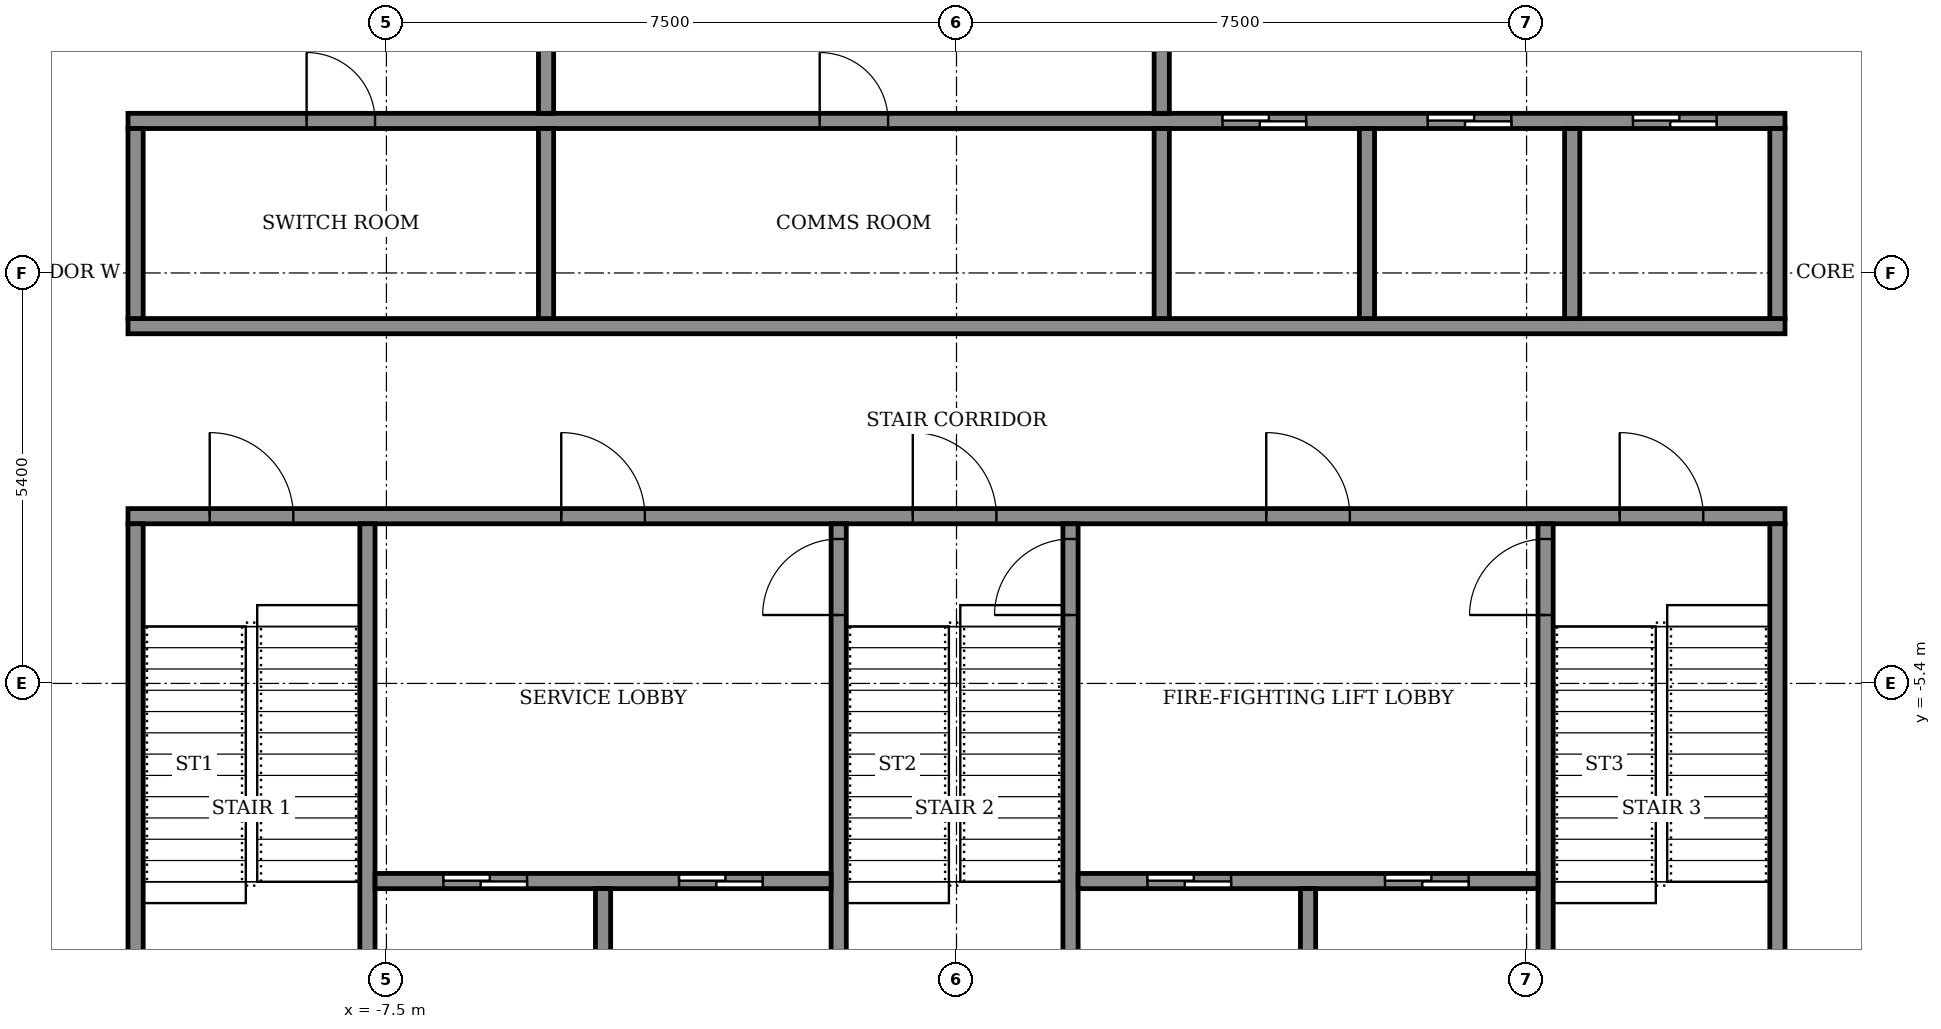
"""IFC4 building model, lengths in metres.
Left out: names, types, materials, properties, quantities, classifications, styles, units other than length and angle.
Written with IfcOpenShell. Run it as: python <this file> out.ifc"""

import sys

from ifc_helpers import new_model, si_unit, direction, frame, frame_2d, origin, place, context, subcontext, project, spatial, rectangle, extrude, element, fill, save


model = new_model("IFC4")
c1 = context("Model", 3, precision=1e-05, world=origin(), true_north=direction((0.0, 1.0)))
c2 = subcontext(c1, "Body", "Model", "MODEL_VIEW")
j1 = project(units=[si_unit("LENGTHUNIT", "METRE"), si_unit("PLANEANGLEUNIT", "RADIAN")], contexts=[c1])
p1 = place(None, origin())
s1 = spatial("IfcSite", under=j1, at=p1, CompositionType="ELEMENT")
p2 = place(p1, origin())
s2 = spatial("IfcBuilding", under=s1, at=p2, CompositionType="ELEMENT")
p3 = place(p2, frame((0.0, 0.0, 148.1)))
s3 = spatial("IfcBuildingStorey", under=s2, at=p3, CompositionType="ELEMENT", Elevation=148.1)
p4 = place(p3, frame((-10.9, -3.2, 0.0), z_axis=(0.0, 0.0, 1.0), x_axis=(1.0, 0.0, 0.0)))
e1 = element("IfcWall", 1, at=p4, inside=s3, PredefinedType="SHEAR", context=c2, shape_type="SweptSolid", body=[
    extrude(rectangle(XDim=21.8, YDim=0.2, at=frame_2d((10.9, 0.0))), origin(), (0.0, 0.0, 1.0), 4.05),
])
p5 = place(p4, frame((1.075, 0.0, 0.0)))
e2 = element("IfcOpeningElement", 2, at=p5, cuts=e1, PredefinedType="OPENING", context=c2, shape_type="SweptSolid", body=[
    extrude(rectangle(XDim=1.1, YDim=2.1, at=frame_2d((0.55, 1.05))), frame((0.0, 0.11, 0.0), z_axis=(0.0, -1.0, 0.0), x_axis=(1.0, 0.0, 0.0)), (0.0, 0.0, 1.0), 0.22),
])
p6 = place(p4, frame((10.325, 0.0, 0.0)))
e3 = element("IfcOpeningElement", 3, at=p6, cuts=e1, PredefinedType="OPENING", context=c2, shape_type="SweptSolid", body=[
    extrude(rectangle(XDim=1.1, YDim=2.1, at=frame_2d((0.55, 1.05))), frame((0.0, 0.11, 0.0), z_axis=(0.0, -1.0, 0.0), x_axis=(1.0, 0.0, 0.0)), (0.0, 0.0, 1.0), 0.22),
])
p7 = place(p4, frame((19.625, 0.0, 0.0)))
e4 = element("IfcOpeningElement", 4, at=p7, cuts=e1, PredefinedType="OPENING", context=c2, shape_type="SweptSolid", body=[
    extrude(rectangle(XDim=1.1, YDim=2.1, at=frame_2d((0.55, 1.05))), frame((0.0, 0.11, 0.0), z_axis=(0.0, -1.0, 0.0), x_axis=(1.0, 0.0, 0.0)), (0.0, 0.0, 1.0), 0.22),
])
p8 = place(p4, frame((5.7, 0.0, 0.0)))
e5 = element("IfcOpeningElement", 5, at=p8, cuts=e1, PredefinedType="OPENING", context=c2, shape_type="SweptSolid", body=[
    extrude(rectangle(XDim=1.1, YDim=2.1, at=frame_2d((0.55, 1.05))), frame((0.0, 0.11, 0.0), z_axis=(0.0, -1.0, 0.0), x_axis=(1.0, 0.0, 0.0)), (0.0, 0.0, 1.0), 0.22),
])
p9 = place(p4, frame((14.975, 0.0, 0.0)))
e6 = element("IfcOpeningElement", 6, at=p9, cuts=e1, PredefinedType="OPENING", context=c2, shape_type="SweptSolid", body=[
    extrude(rectangle(XDim=1.1, YDim=2.1, at=frame_2d((0.55, 1.05))), frame((0.0, 0.11, 0.0), z_axis=(0.0, -1.0, 0.0), x_axis=(1.0, 0.0, 0.0)), (0.0, 0.0, 1.0), 0.22),
])
p10 = place(p3, frame((-10.9, -0.7, 0.0), z_axis=(0.0, 0.0, 1.0), x_axis=(1.0, 0.0, 0.0)))
e7 = element("IfcWall", 7, at=p10, inside=s3, PredefinedType="SHEAR", context=c2, shape_type="SweptSolid", body=[
    extrude(rectangle(XDim=21.8, YDim=0.2, at=frame_2d((10.9, 0.0))), origin(), (0.0, 0.0, 1.0), 4.05),
])
p11 = place(p3, frame((-10.9, 2.0, 0.0), z_axis=(0.0, 0.0, 1.0), x_axis=(1.0, 0.0, 0.0)))
e8 = element("IfcWall", 8, at=p11, inside=s3, PredefinedType="SHEAR", context=c2, shape_type="SweptSolid", body=[
    extrude(rectangle(XDim=21.8, YDim=0.2, at=frame_2d((10.9, 0.0))), origin(), (0.0, 0.0, 1.0), 4.05),
])
p12 = place(p11, frame((14.4, 0.0, 0.0)))
e9 = element("IfcOpeningElement", 9, at=p12, cuts=e8, PredefinedType="OPENING", context=c2, shape_type="SweptSolid", body=[
    extrude(rectangle(XDim=1.1, YDim=2.1, at=frame_2d((0.55, 1.05))), frame((0.0, 0.11, 0.0), z_axis=(0.0, -1.0, 0.0), x_axis=(1.0, 0.0, 0.0)), (0.0, 0.0, 1.0), 0.22),
])
p13 = place(p11, frame((17.1, 0.0, 0.0)))
e10 = element("IfcOpeningElement", 10, at=p13, cuts=e8, PredefinedType="OPENING", context=c2, shape_type="SweptSolid", body=[
    extrude(rectangle(XDim=1.1, YDim=2.1, at=frame_2d((0.55, 1.05))), frame((0.0, 0.11, 0.0), z_axis=(0.0, -1.0, 0.0), x_axis=(1.0, 0.0, 0.0)), (0.0, 0.0, 1.0), 0.22),
])
p14 = place(p11, frame((19.8, 0.0, 0.0)))
e11 = element("IfcOpeningElement", 11, at=p14, cuts=e8, PredefinedType="OPENING", context=c2, shape_type="SweptSolid", body=[
    extrude(rectangle(XDim=1.1, YDim=2.1, at=frame_2d((0.55, 1.05))), frame((0.0, 0.11, 0.0), z_axis=(0.0, -1.0, 0.0), x_axis=(1.0, 0.0, 0.0)), (0.0, 0.0, 1.0), 0.22),
])
p15 = place(p11, frame((2.35, 0.0, 0.0)))
e12 = element("IfcOpeningElement", 12, at=p15, cuts=e8, PredefinedType="OPENING", context=c2, shape_type="SweptSolid", body=[
    extrude(rectangle(XDim=0.9, YDim=2.1, at=frame_2d((0.45, 1.05))), frame((0.0, 0.11, 0.0), z_axis=(0.0, -1.0, 0.0), x_axis=(1.0, 0.0, 0.0)), (0.0, 0.0, 1.0), 0.22),
])
p16 = place(p11, frame((9.1, 0.0, 0.0)))
e13 = element("IfcOpeningElement", 13, at=p16, cuts=e8, PredefinedType="OPENING", context=c2, shape_type="SweptSolid", body=[
    extrude(rectangle(XDim=0.9, YDim=2.1, at=frame_2d((0.45, 1.05))), frame((0.0, 0.11, 0.0), z_axis=(0.0, -1.0, 0.0), x_axis=(1.0, 0.0, 0.0)), (0.0, 0.0, 1.0), 0.22),
])
for number, where, z_axis, x_axis in (
    (14, (-10.8, -10.8, 0.0), (0.0, 0.0, 1.0), (0.0, 1.0, 0.0)),
    (15, (-7.75, -10.8, 0.0), (0.0, 0.0, 1.0), (0.0, 1.0, 0.0)),
):
    element("IfcWall", number, at=place(p3, frame(where, z_axis=z_axis, x_axis=x_axis)), inside=s3, PredefinedType="SHEAR", context=c2, shape_type="SweptSolid", body=[
        extrude(rectangle(XDim=7.5, YDim=0.2, at=frame_2d((3.75, 0.0))), origin(), (0.0, 0.0, 1.0), 4.05),
    ])
p17 = place(p3, frame((-1.55, -10.8, 0.0), z_axis=(0.0, 0.0, 1.0), x_axis=(0.0, 1.0, 0.0)))
e16 = element("IfcWall", 16, at=p17, inside=s3, PredefinedType="SHEAR", context=c2, shape_type="SweptSolid", body=[
    extrude(rectangle(XDim=7.5, YDim=0.2, at=frame_2d((3.75, 0.0))), origin(), (0.0, 0.0, 1.0), 4.05),
])
p18 = place(p17, frame((6.3, 0.0, 0.0)))
e17 = element("IfcOpeningElement", 17, at=p18, cuts=e16, PredefinedType="OPENING", context=c2, shape_type="SweptSolid", body=[
    extrude(rectangle(XDim=1.0, YDim=2.1, at=frame_2d((0.5, 1.05))), frame((0.0, 0.11, 0.0), z_axis=(0.0, -1.0, 0.0), x_axis=(1.0, 0.0, 0.0)), (0.0, 0.0, 1.0), 0.22),
])
p19 = place(p3, frame((1.5, -10.8, 0.0), z_axis=(0.0, 0.0, 1.0), x_axis=(0.0, 1.0, 0.0)))
e18 = element("IfcWall", 18, at=p19, inside=s3, PredefinedType="SHEAR", context=c2, shape_type="SweptSolid", body=[
    extrude(rectangle(XDim=7.5, YDim=0.2, at=frame_2d((3.75, 0.0))), origin(), (0.0, 0.0, 1.0), 4.05),
])
p20 = place(p19, frame((6.3, 0.0, 0.0)))
e19 = element("IfcOpeningElement", 19, at=p20, cuts=e18, PredefinedType="OPENING", context=c2, shape_type="SweptSolid", body=[
    extrude(rectangle(XDim=1.0, YDim=2.1, at=frame_2d((0.5, 1.05))), frame((0.0, 0.11, 0.0), z_axis=(0.0, -1.0, 0.0), x_axis=(1.0, 0.0, 0.0)), (0.0, 0.0, 1.0), 0.22),
])
p21 = place(p3, frame((7.75, -10.8, 0.0), z_axis=(0.0, 0.0, 1.0), x_axis=(0.0, 1.0, 0.0)))
e20 = element("IfcWall", 20, at=p21, inside=s3, PredefinedType="SHEAR", context=c2, shape_type="SweptSolid", body=[
    extrude(rectangle(XDim=7.5, YDim=0.2, at=frame_2d((3.75, 0.0))), origin(), (0.0, 0.0, 1.0), 4.05),
])
p22 = place(p21, frame((6.3, 0.0, 0.0)))
e21 = element("IfcOpeningElement", 21, at=p22, cuts=e20, PredefinedType="OPENING", context=c2, shape_type="SweptSolid", body=[
    extrude(rectangle(XDim=1.0, YDim=2.1, at=frame_2d((0.5, 1.05))), frame((0.0, 0.11, 0.0), z_axis=(0.0, -1.0, 0.0), x_axis=(1.0, 0.0, 0.0)), (0.0, 0.0, 1.0), 0.22),
])
p23 = place(p3, frame((10.8, -10.8, 0.0), z_axis=(0.0, 0.0, 1.0), x_axis=(0.0, 1.0, 0.0)))
e22 = element("IfcWall", 22, at=p23, inside=s3, PredefinedType="SHEAR", context=c2, shape_type="SweptSolid", body=[
    extrude(rectangle(XDim=7.5, YDim=0.2, at=frame_2d((3.75, 0.0))), origin(), (0.0, 0.0, 1.0), 4.05),
])
p24 = place(p3, frame((-7.65, -8.0, 0.0), z_axis=(0.0, 0.0, 1.0), x_axis=(1.0, 0.0, 0.0)))
e23 = element("IfcWall", 23, at=p24, inside=s3, PredefinedType="SHEAR", context=c2, shape_type="SweptSolid", body=[
    extrude(rectangle(XDim=6.0, YDim=0.2, at=frame_2d((3.0, 0.0))), origin(), (0.0, 0.0, 1.0), 4.05),
])
p25 = place(p24, frame((0.9, 0.0, 0.0)))
e24 = element("IfcOpeningElement", 24, at=p25, cuts=e23, PredefinedType="OPENING", context=c2, shape_type="SweptSolid", body=[
    extrude(rectangle(XDim=1.1, YDim=2.1, at=frame_2d((0.55, 1.05))), frame((0.0, 0.11, 0.0), z_axis=(0.0, -1.0, 0.0), x_axis=(1.0, 0.0, 0.0)), (0.0, 0.0, 1.0), 0.22),
])
p26 = place(p24, frame((4.0, 0.0, 0.0)))
e25 = element("IfcOpeningElement", 25, at=p26, cuts=e23, PredefinedType="OPENING", context=c2, shape_type="SweptSolid", body=[
    extrude(rectangle(XDim=1.1, YDim=2.1, at=frame_2d((0.55, 1.05))), frame((0.0, 0.11, 0.0), z_axis=(0.0, -1.0, 0.0), x_axis=(1.0, 0.0, 0.0)), (0.0, 0.0, 1.0), 0.22),
])
p27 = place(p3, frame((-4.65, -10.8, 0.0), z_axis=(0.0, 0.0, 1.0), x_axis=(0.0, 1.0, 0.0)))
e26 = element("IfcWall", 26, at=p27, inside=s3, PredefinedType="SHEAR", context=c2, shape_type="SweptSolid", body=[
    extrude(rectangle(XDim=2.7, YDim=0.2, at=frame_2d((1.35, 0.0))), origin(), (0.0, 0.0, 1.0), 4.05),
])
p28 = place(p3, frame((1.6, -8.0, 0.0), z_axis=(0.0, 0.0, 1.0), x_axis=(1.0, 0.0, 0.0)))
e27 = element("IfcWall", 27, at=p28, inside=s3, PredefinedType="SHEAR", context=c2, shape_type="SweptSolid", body=[
    extrude(rectangle(XDim=6.05, YDim=0.2, at=frame_2d((3.025, 0.0))), origin(), (0.0, 0.0, 1.0), 4.05),
])
p29 = place(p28, frame((0.913, 0.0, 0.0)))
e28 = element("IfcOpeningElement", 28, at=p29, cuts=e27, PredefinedType="OPENING", context=c2, shape_type="SweptSolid", body=[
    extrude(rectangle(XDim=1.1, YDim=2.1, at=frame_2d((0.55, 1.05))), frame((0.0, 0.11, 0.0), z_axis=(0.0, -1.0, 0.0), x_axis=(1.0, 0.0, 0.0)), (0.0, 0.0, 1.0), 0.22),
])
p30 = place(p28, frame((4.038, 0.0, 0.0)))
e29 = element("IfcOpeningElement", 29, at=p30, cuts=e27, PredefinedType="OPENING", context=c2, shape_type="SweptSolid", body=[
    extrude(rectangle(XDim=1.1, YDim=2.1, at=frame_2d((0.55, 1.05))), frame((0.0, 0.11, 0.0), z_axis=(0.0, -1.0, 0.0), x_axis=(1.0, 0.0, 0.0)), (0.0, 0.0, 1.0), 0.22),
])
p31 = place(p3, frame((4.625, -10.8, 0.0), z_axis=(0.0, 0.0, 1.0), x_axis=(0.0, 1.0, 0.0)))
e30 = element("IfcWall", 30, at=p31, inside=s3, PredefinedType="SHEAR", context=c2, shape_type="SweptSolid", body=[
    extrude(rectangle(XDim=2.7, YDim=0.2, at=frame_2d((1.35, 0.0))), origin(), (0.0, 0.0, 1.0), 4.05),
])
for number, where, z_axis, x_axis in (
    (31, (-10.8, -0.6, 0.0), (0.0, 0.0, 1.0), (0.0, 1.0, 0.0)),
    (32, (-5.4, -0.6, 0.0), (0.0, 0.0, 1.0), (0.0, 1.0, 0.0)),
):
    element("IfcWall", number, at=place(p3, frame(where, z_axis=z_axis, x_axis=x_axis)), inside=s3, PredefinedType="STANDARD", context=c2, shape_type="SweptSolid", body=[
        extrude(rectangle(XDim=2.5, YDim=0.2, at=frame_2d((1.25, 0.0))), origin(), (0.0, 0.0, 1.0), 4.05),
    ])
for number, where, z_axis, x_axis in (
    (33, (2.7, -0.6, 0.0), (0.0, 0.0, 1.0), (0.0, 1.0, 0.0)),
    (34, (5.4, -0.6, 0.0), (0.0, 0.0, 1.0), (0.0, 1.0, 0.0)),
    (35, (8.1, -0.6, 0.0), (0.0, 0.0, 1.0), (0.0, 1.0, 0.0)),
    (36, (10.8, -0.6, 0.0), (0.0, 0.0, 1.0), (0.0, 1.0, 0.0)),
):
    element("IfcWall", number, at=place(p3, frame(where, z_axis=z_axis, x_axis=x_axis)), inside=s3, PredefinedType="SHEAR", context=c2, shape_type="SweptSolid", body=[
        extrude(rectangle(XDim=2.5, YDim=0.2, at=frame_2d((1.25, 0.0))), origin(), (0.0, 0.0, 1.0), 4.05),
    ])
p32 = place(p3, frame((-5.4, 2.1, 0.0), z_axis=(0.0, 0.0, 1.0), x_axis=(0.0, 1.0, 0.0)))
e37 = element("IfcWall", 37, at=p32, inside=s3, PredefinedType="STANDARD", context=c2, shape_type="SweptSolid", body=[
    extrude(rectangle(XDim=5.9, YDim=0.2, at=frame_2d((2.95, 0.0))), origin(), (0.0, 0.0, 1.0), 4.05),
])
p33 = place(p32, frame((2.35, 0.0, 0.0)))
e38 = element("IfcOpeningElement", 38, at=p33, cuts=e37, PredefinedType="OPENING", context=c2, shape_type="SweptSolid", body=[
    extrude(rectangle(XDim=1.2, YDim=2.1, at=frame_2d((0.6, 1.05))), frame((0.0, 0.11, 0.0), z_axis=(0.0, -1.0, 0.0), x_axis=(1.0, 0.0, 0.0)), (0.0, 0.0, 1.0), 0.22),
])
p34 = place(p3, frame((2.7, 2.1, 0.0), z_axis=(0.0, 0.0, 1.0), x_axis=(0.0, 1.0, 0.0)))
e39 = element("IfcWall", 39, at=p34, inside=s3, PredefinedType="STANDARD", context=c2, shape_type="SweptSolid", body=[
    extrude(rectangle(XDim=5.9, YDim=0.2, at=frame_2d((2.95, 0.0))), origin(), (0.0, 0.0, 1.0), 4.05),
])
p35 = place(p34, frame((2.35, 0.0, 0.0)))
e40 = element("IfcOpeningElement", 40, at=p35, cuts=e39, PredefinedType="OPENING", context=c2, shape_type="SweptSolid", body=[
    extrude(rectangle(XDim=1.2, YDim=2.1, at=frame_2d((0.6, 1.05))), frame((0.0, 0.11, 0.0), z_axis=(0.0, -1.0, 0.0), x_axis=(1.0, 0.0, 0.0)), (0.0, 0.0, 1.0), 0.22),
])
p36 = place(p12, origin())
e41 = element("IfcDoor", 41, at=p36, inside=s3, OperationType="SLIDING_TO_LEFT", PredefinedType="DOOR", context=c2, shape_type="SweptSolid", body=[
    extrude(rectangle(XDim=1.1, YDim=2.1, at=frame_2d((0.55, 1.05))), frame((0.0, 0.025, 0.0), z_axis=(0.0, -1.0, 0.0), x_axis=(1.0, 0.0, 0.0)), (0.0, 0.0, 1.0), 0.05),
])
fill(e9, e41)
p37 = place(p13, origin())
e42 = element("IfcDoor", 42, at=p37, inside=s3, OperationType="SLIDING_TO_LEFT", PredefinedType="DOOR", context=c2, shape_type="SweptSolid", body=[
    extrude(rectangle(XDim=1.1, YDim=2.1, at=frame_2d((0.55, 1.05))), frame((0.0, 0.025, 0.0), z_axis=(0.0, -1.0, 0.0), x_axis=(1.0, 0.0, 0.0)), (0.0, 0.0, 1.0), 0.05),
])
fill(e10, e42)
p38 = place(p14, origin())
e43 = element("IfcDoor", 43, at=p38, inside=s3, OperationType="SLIDING_TO_LEFT", PredefinedType="DOOR", context=c2, shape_type="SweptSolid", body=[
    extrude(rectangle(XDim=1.1, YDim=2.1, at=frame_2d((0.55, 1.05))), frame((0.0, 0.025, 0.0), z_axis=(0.0, -1.0, 0.0), x_axis=(1.0, 0.0, 0.0)), (0.0, 0.0, 1.0), 0.05),
])
fill(e11, e43)
p39 = place(p15, origin())
e44 = element("IfcDoor", 44, at=p39, inside=s3, OperationType="SINGLE_SWING_LEFT", PredefinedType="DOOR", context=c2, shape_type="SweptSolid", body=[
    extrude(rectangle(XDim=0.9, YDim=2.1, at=frame_2d((0.45, 1.05))), frame((0.0, 0.025, 0.0), z_axis=(0.0, -1.0, 0.0), x_axis=(1.0, 0.0, 0.0)), (0.0, 0.0, 1.0), 0.05),
])
fill(e12, e44)
p40 = place(p16, origin())
e45 = element("IfcDoor", 45, at=p40, inside=s3, OperationType="SINGLE_SWING_LEFT", PredefinedType="DOOR", context=c2, shape_type="SweptSolid", body=[
    extrude(rectangle(XDim=0.9, YDim=2.1, at=frame_2d((0.45, 1.05))), frame((0.0, 0.025, 0.0), z_axis=(0.0, -1.0, 0.0), x_axis=(1.0, 0.0, 0.0)), (0.0, 0.0, 1.0), 0.05),
])
fill(e13, e45)
p41 = place(p29, origin())
e46 = element("IfcDoor", 46, at=p41, inside=s3, OperationType="SLIDING_TO_LEFT", PredefinedType="DOOR", context=c2, shape_type="SweptSolid", body=[
    extrude(rectangle(XDim=1.1, YDim=2.1, at=frame_2d((0.55, 1.05))), frame((0.0, 0.025, 0.0), z_axis=(0.0, -1.0, 0.0), x_axis=(1.0, 0.0, 0.0)), (0.0, 0.0, 1.0), 0.05),
])
fill(e28, e46)
p42 = place(p25, origin())
e47 = element("IfcDoor", 47, at=p42, inside=s3, OperationType="SLIDING_TO_LEFT", PredefinedType="DOOR", context=c2, shape_type="SweptSolid", body=[
    extrude(rectangle(XDim=1.1, YDim=2.1, at=frame_2d((0.55, 1.05))), frame((0.0, 0.025, 0.0), z_axis=(0.0, -1.0, 0.0), x_axis=(1.0, 0.0, 0.0)), (0.0, 0.0, 1.0), 0.05),
])
fill(e24, e47)
p43 = place(p30, origin())
e48 = element("IfcDoor", 48, at=p43, inside=s3, OperationType="SLIDING_TO_LEFT", PredefinedType="DOOR", context=c2, shape_type="SweptSolid", body=[
    extrude(rectangle(XDim=1.1, YDim=2.1, at=frame_2d((0.55, 1.05))), frame((0.0, 0.025, 0.0), z_axis=(0.0, -1.0, 0.0), x_axis=(1.0, 0.0, 0.0)), (0.0, 0.0, 1.0), 0.05),
])
fill(e29, e48)
p44 = place(p26, origin())
e49 = element("IfcDoor", 49, at=p44, inside=s3, OperationType="SLIDING_TO_LEFT", PredefinedType="DOOR", context=c2, shape_type="SweptSolid", body=[
    extrude(rectangle(XDim=1.1, YDim=2.1, at=frame_2d((0.55, 1.05))), frame((0.0, 0.025, 0.0), z_axis=(0.0, -1.0, 0.0), x_axis=(1.0, 0.0, 0.0)), (0.0, 0.0, 1.0), 0.05),
])
fill(e25, e49)
p45 = place(p5, origin())
e50 = element("IfcDoor", 50, at=p45, inside=s3, OperationType="SINGLE_SWING_RIGHT", PredefinedType="DOOR", context=c2, shape_type="SweptSolid", body=[
    extrude(rectangle(XDim=1.1, YDim=2.1, at=frame_2d((0.55, 1.05))), frame((0.0, 0.025, 0.0), z_axis=(0.0, -1.0, 0.0), x_axis=(1.0, 0.0, 0.0)), (0.0, 0.0, 1.0), 0.05),
])
fill(e2, e50)
p46 = place(p6, origin())
e51 = element("IfcDoor", 51, at=p46, inside=s3, OperationType="SINGLE_SWING_RIGHT", PredefinedType="DOOR", context=c2, shape_type="SweptSolid", body=[
    extrude(rectangle(XDim=1.1, YDim=2.1, at=frame_2d((0.55, 1.05))), frame((0.0, 0.025, 0.0), z_axis=(0.0, -1.0, 0.0), x_axis=(1.0, 0.0, 0.0)), (0.0, 0.0, 1.0), 0.05),
])
fill(e3, e51)
p47 = place(p7, origin())
e52 = element("IfcDoor", 52, at=p47, inside=s3, OperationType="SINGLE_SWING_RIGHT", PredefinedType="DOOR", context=c2, shape_type="SweptSolid", body=[
    extrude(rectangle(XDim=1.1, YDim=2.1, at=frame_2d((0.55, 1.05))), frame((0.0, 0.025, 0.0), z_axis=(0.0, -1.0, 0.0), x_axis=(1.0, 0.0, 0.0)), (0.0, 0.0, 1.0), 0.05),
])
fill(e4, e52)
p48 = place(p8, origin())
e53 = element("IfcDoor", 53, at=p48, inside=s3, OperationType="SINGLE_SWING_LEFT", PredefinedType="DOOR", context=c2, shape_type="SweptSolid", body=[
    extrude(rectangle(XDim=1.1, YDim=2.1, at=frame_2d((0.55, 1.05))), frame((0.0, 0.025, 0.0), z_axis=(0.0, -1.0, 0.0), x_axis=(1.0, 0.0, 0.0)), (0.0, 0.0, 1.0), 0.05),
])
fill(e5, e53)
p49 = place(p9, origin())
e54 = element("IfcDoor", 54, at=p49, inside=s3, OperationType="SINGLE_SWING_LEFT", PredefinedType="DOOR", context=c2, shape_type="SweptSolid", body=[
    extrude(rectangle(XDim=1.1, YDim=2.1, at=frame_2d((0.55, 1.05))), frame((0.0, 0.025, 0.0), z_axis=(0.0, -1.0, 0.0), x_axis=(1.0, 0.0, 0.0)), (0.0, 0.0, 1.0), 0.05),
])
fill(e6, e54)
p50 = place(p18, origin())
e55 = element("IfcDoor", 55, at=p50, inside=s3, OperationType="SINGLE_SWING_RIGHT", PredefinedType="DOOR", context=c2, shape_type="SweptSolid", body=[
    extrude(rectangle(XDim=1.0, YDim=2.1, at=frame_2d((0.5, 1.05))), frame((0.0, 0.025, 0.0), z_axis=(0.0, -1.0, 0.0), x_axis=(1.0, 0.0, 0.0)), (0.0, 0.0, 1.0), 0.05),
])
fill(e17, e55)
p51 = place(p20, origin())
e56 = element("IfcDoor", 56, at=p51, inside=s3, OperationType="SINGLE_SWING_RIGHT", PredefinedType="DOOR", context=c2, shape_type="SweptSolid", body=[
    extrude(rectangle(XDim=1.0, YDim=2.1, at=frame_2d((0.5, 1.05))), frame((0.0, 0.025, 0.0), z_axis=(0.0, -1.0, 0.0), x_axis=(1.0, 0.0, 0.0)), (0.0, 0.0, 1.0), 0.05),
])
fill(e19, e56)
p52 = place(p22, origin())
e57 = element("IfcDoor", 57, at=p52, inside=s3, OperationType="SINGLE_SWING_RIGHT", PredefinedType="DOOR", context=c2, shape_type="SweptSolid", body=[
    extrude(rectangle(XDim=1.0, YDim=2.1, at=frame_2d((0.5, 1.05))), frame((0.0, 0.025, 0.0), z_axis=(0.0, -1.0, 0.0), x_axis=(1.0, 0.0, 0.0)), (0.0, 0.0, 1.0), 0.05),
])
fill(e21, e57)
save(model, sys.argv[1])
